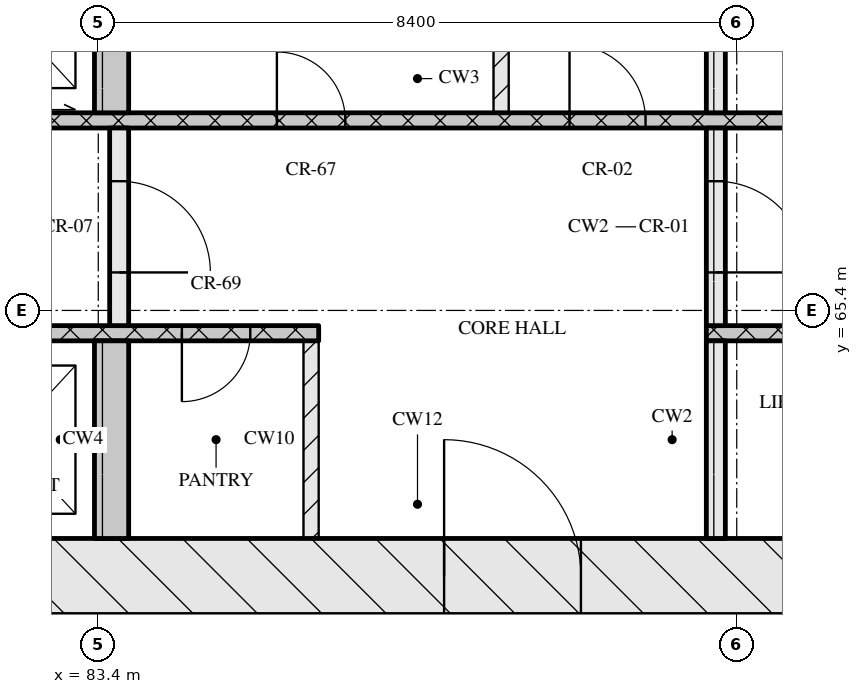
"""IFC4 building model, lengths in metres.
Left out: names, types, materials, properties, quantities, classifications, styles, units other than length and angle.
Written with IfcOpenShell. Run it as: python <this file> out.ifc"""

import sys

from ifc_helpers import new_model, si_unit, direction, frame, frame_2d, origin, place, context, subcontext, project, spatial, rectangle, extrude, element, fill, save


model = new_model("IFC4")
c1 = context("Model", 3, precision=1e-05, world=origin(), true_north=direction((0.0, 1.0)))
c2 = subcontext(c1, "Body", "Model", "MODEL_VIEW")
j1 = project(units=[si_unit("LENGTHUNIT", "METRE"), si_unit("PLANEANGLEUNIT", "RADIAN")], contexts=[c1])
p1 = place(None, origin())
s1 = spatial("IfcSite", under=j1, at=p1, CompositionType="ELEMENT")
p2 = place(p1, origin())
s2 = spatial("IfcBuilding", under=s1, at=p2, CompositionType="ELEMENT")
p3 = place(p2, frame((0.0, 0.0, 138.45)))
s3 = spatial("IfcBuildingStorey", under=s2, at=p3, CompositionType="ELEMENT", Elevation=138.45)
p4 = place(p3, frame((66.8, 61.9, 0.0), z_axis=(0.0, 0.0, 1.0), x_axis=(1.0, 0.0, 0.0)))
e1 = element("IfcWall", 1, at=p4, inside=s3, PredefinedType="SOLIDWALL", context=c2, shape_type="SweptSolid", body=[
    extrude(rectangle(XDim=41.6, YDim=1.0, at=frame_2d((20.8, 0.0))), origin(), (0.0, 0.0, 1.0), 3.3),
])
p5 = place(p4, frame((21.15, 0.0, 0.0)))
e2 = element("IfcOpeningElement", 2, at=p5, cuts=e1, PredefinedType="OPENING", context=c2, shape_type="SweptSolid", body=[
    extrude(rectangle(XDim=1.8, YDim=2.1, at=frame_2d((0.9, 1.05))), frame((0.0, 0.51, 0.0), z_axis=(0.0, -1.0, 0.0), x_axis=(1.0, 0.0, 0.0)), (0.0, 0.0, 1.0), 1.02),
])
p6 = place(p3, frame((83.575, 62.4, 0.0), z_axis=(0.0, 0.0, 1.0), x_axis=(0.0, 1.0, 0.0)))
e3 = element("IfcWall", 3, at=p6, inside=s3, PredefinedType="SOLIDWALL", context=c2, shape_type="SweptSolid", body=[
    extrude(rectangle(XDim=2.6, YDim=0.45, at=frame_2d((1.3, 0.0))), origin(), (0.0, 0.0, 1.0), 3.3),
])
p7 = place(p3, frame((86.2, 62.4, 0.0), z_axis=(0.0, 0.0, 1.0), x_axis=(0.0, 1.0, 0.0)))
e4 = element("IfcWall", 4, at=p7, inside=s3, PredefinedType="PARTITIONING", context=c2, shape_type="SweptSolid", body=[
    extrude(rectangle(XDim=2.6, YDim=0.2, at=frame_2d((1.3, 0.0))), origin(), (0.0, 0.0, 1.0), 3.3),
])
p8 = place(p3, frame((91.525, 62.4, 0.0), z_axis=(0.0, 0.0, 1.0), x_axis=(0.0, 1.0, 0.0)))
e5 = element("IfcWall", 5, at=p8, inside=s3, PredefinedType="SOLIDWALL", context=c2, shape_type="SweptSolid", body=[
    extrude(rectangle(XDim=2.6, YDim=0.25, at=frame_2d((1.3, 0.0))), origin(), (0.0, 0.0, 1.0), 3.3),
])
p9 = place(p3, frame((67.8, 65.1, 0.0), z_axis=(0.0, 0.0, 1.0), x_axis=(1.0, 0.0, 0.0)))
e6 = element("IfcWall", 6, at=p9, inside=s3, PredefinedType="SOLIDWALL", context=c2, shape_type="SweptSolid", body=[
    extrude(rectangle(XDim=18.5, YDim=0.2, at=frame_2d((9.25, 0.0))), origin(), (0.0, 0.0, 1.0), 3.3),
])
p10 = place(p9, frame((7.27, 0.0, 0.0)))
e7 = element("IfcOpeningElement", 7, at=p10, cuts=e6, PredefinedType="OPENING", context=c2, shape_type="SweptSolid", body=[
    extrude(rectangle(XDim=0.9, YDim=2.1, at=frame_2d((0.45, 1.05))), frame((0.0, 0.11, 0.0), z_axis=(0.0, -1.0, 0.0), x_axis=(1.0, 0.0, 0.0)), (0.0, 0.0, 1.0), 0.22),
])
p11 = place(p9, frame((8.85, 0.0, 0.0)))
e8 = element("IfcOpeningElement", 8, at=p11, cuts=e6, PredefinedType="OPENING", context=c2, shape_type="SweptSolid", body=[
    extrude(rectangle(XDim=1.1, YDim=2.1, at=frame_2d((0.55, 1.05))), frame((0.0, 0.11, 0.0), z_axis=(0.0, -1.0, 0.0), x_axis=(1.0, 0.0, 0.0)), (0.0, 0.0, 1.0), 0.22),
])
p12 = place(p9, frame((11.35, 0.0, 0.0)))
e9 = element("IfcOpeningElement", 9, at=p12, cuts=e6, PredefinedType="OPENING", context=c2, shape_type="SweptSolid", body=[
    extrude(rectangle(XDim=1.1, YDim=2.1, at=frame_2d((0.55, 1.05))), frame((0.0, 0.11, 0.0), z_axis=(0.0, -1.0, 0.0), x_axis=(1.0, 0.0, 0.0)), (0.0, 0.0, 1.0), 0.22),
])
p13 = place(p9, frame((13.85, 0.0, 0.0)))
e10 = element("IfcOpeningElement", 10, at=p13, cuts=e6, PredefinedType="OPENING", context=c2, shape_type="SweptSolid", body=[
    extrude(rectangle(XDim=1.1, YDim=2.1, at=frame_2d((0.55, 1.05))), frame((0.0, 0.11, 0.0), z_axis=(0.0, -1.0, 0.0), x_axis=(1.0, 0.0, 0.0)), (0.0, 0.0, 1.0), 0.22),
])
p14 = place(p9, frame((16.7, 0.0, 0.0)))
e11 = element("IfcOpeningElement", 11, at=p14, cuts=e6, PredefinedType="OPENING", context=c2, shape_type="SweptSolid", body=[
    extrude(rectangle(XDim=0.9, YDim=2.1, at=frame_2d((0.45, 1.05))), frame((0.0, 0.11, 0.0), z_axis=(0.0, -1.0, 0.0), x_axis=(1.0, 0.0, 0.0)), (0.0, 0.0, 1.0), 0.22),
])
p15 = place(p3, frame((91.4, 65.1, 0.0), z_axis=(0.0, 0.0, 1.0), x_axis=(1.0, 0.0, 0.0)))
e12 = element("IfcWall", 12, at=p15, inside=s3, PredefinedType="SOLIDWALL", context=c2, shape_type="SweptSolid", body=[
    extrude(rectangle(XDim=16.0, YDim=0.2, at=frame_2d((8.0, 0.0))), origin(), (0.0, 0.0, 1.0), 3.3),
])
p16 = place(p15, frame((7.83, 0.0, 0.0)))
e13 = element("IfcOpeningElement", 13, at=p16, cuts=e12, PredefinedType="OPENING", context=c2, shape_type="SweptSolid", body=[
    extrude(rectangle(XDim=0.9, YDim=2.1, at=frame_2d((0.45, 1.05))), frame((0.0, 0.11, 0.0), z_axis=(0.0, -1.0, 0.0), x_axis=(1.0, 0.0, 0.0)), (0.0, 0.0, 1.0), 0.22),
])
p17 = place(p3, frame((83.675, 65.2, 0.0), z_axis=(0.0, 0.0, 1.0), x_axis=(0.0, 1.0, 0.0)))
e14 = element("IfcWall", 14, at=p17, inside=s3, PredefinedType="SOLIDWALL", context=c2, shape_type="SweptSolid", body=[
    extrude(rectangle(XDim=2.6, YDim=0.25, at=frame_2d((1.3, 0.0))), origin(), (0.0, 0.0, 1.0), 3.3),
])
p18 = place(p17, frame((0.7, 0.0, 0.0)))
e15 = element("IfcOpeningElement", 15, at=p18, cuts=e14, PredefinedType="OPENING", context=c2, shape_type="SweptSolid", body=[
    extrude(rectangle(XDim=1.2, YDim=2.1, at=frame_2d((0.6, 1.05))), frame((0.0, 0.135, 0.0), z_axis=(0.0, -1.0, 0.0), x_axis=(1.0, 0.0, 0.0)), (0.0, 0.0, 1.0), 0.27),
])
p19 = place(p3, frame((91.525, 65.2, 0.0), z_axis=(0.0, 0.0, 1.0), x_axis=(0.0, 1.0, 0.0)))
e16 = element("IfcWall", 16, at=p19, inside=s3, PredefinedType="SOLIDWALL", context=c2, shape_type="SweptSolid", body=[
    extrude(rectangle(XDim=2.6, YDim=0.25, at=frame_2d((1.3, 0.0))), origin(), (0.0, 0.0, 1.0), 3.3),
])
p20 = place(p19, frame((0.7, 0.0, 0.0)))
e17 = element("IfcOpeningElement", 17, at=p20, cuts=e16, PredefinedType="OPENING", context=c2, shape_type="SweptSolid", body=[
    extrude(rectangle(XDim=1.2, YDim=2.1, at=frame_2d((0.6, 1.05))), frame((0.0, 0.135, 0.0), z_axis=(0.0, -1.0, 0.0), x_axis=(1.0, 0.0, 0.0)), (0.0, 0.0, 1.0), 0.27),
])
p21 = place(p3, frame((76.05, 67.9, 0.0), z_axis=(0.0, 0.0, 1.0), x_axis=(1.0, 0.0, 0.0)))
e18 = element("IfcWall", 18, at=p21, inside=s3, PredefinedType="SOLIDWALL", context=c2, shape_type="SweptSolid", body=[
    extrude(rectangle(XDim=23.1, YDim=0.2, at=frame_2d((11.55, 0.0))), origin(), (0.0, 0.0, 1.0), 3.3),
])
p22 = place(p21, frame((0.6, 0.0, 0.0)))
e19 = element("IfcOpeningElement", 19, at=p22, cuts=e18, PredefinedType="OPENING", context=c2, shape_type="SweptSolid", body=[
    extrude(rectangle(XDim=1.1, YDim=2.1, at=frame_2d((0.55, 1.05))), frame((0.0, 0.11, 0.0), z_axis=(0.0, -1.0, 0.0), x_axis=(1.0, 0.0, 0.0)), (0.0, 0.0, 1.0), 0.22),
])
p23 = place(p21, frame((3.1, 0.0, 0.0)))
e20 = element("IfcOpeningElement", 20, at=p23, cuts=e18, PredefinedType="OPENING", context=c2, shape_type="SweptSolid", body=[
    extrude(rectangle(XDim=1.1, YDim=2.1, at=frame_2d((0.55, 1.05))), frame((0.0, 0.11, 0.0), z_axis=(0.0, -1.0, 0.0), x_axis=(1.0, 0.0, 0.0)), (0.0, 0.0, 1.0), 0.22),
])
p24 = place(p21, frame((5.6, 0.0, 0.0)))
e21 = element("IfcOpeningElement", 21, at=p24, cuts=e18, PredefinedType="OPENING", context=c2, shape_type="SweptSolid", body=[
    extrude(rectangle(XDim=1.1, YDim=2.1, at=frame_2d((0.55, 1.05))), frame((0.0, 0.11, 0.0), z_axis=(0.0, -1.0, 0.0), x_axis=(1.0, 0.0, 0.0)), (0.0, 0.0, 1.0), 0.22),
])
p25 = place(p21, frame((9.7, 0.0, 0.0)))
e22 = element("IfcOpeningElement", 22, at=p25, cuts=e18, PredefinedType="OPENING", context=c2, shape_type="SweptSolid", body=[
    extrude(rectangle(XDim=0.9, YDim=2.1, at=frame_2d((0.45, 1.05))), frame((0.0, 0.11, 0.0), z_axis=(0.0, -1.0, 0.0), x_axis=(1.0, 0.0, 0.0)), (0.0, 0.0, 1.0), 0.22),
])
p26 = place(p21, frame((13.55, 0.0, 0.0)))
e23 = element("IfcOpeningElement", 23, at=p26, cuts=e18, PredefinedType="OPENING", context=c2, shape_type="SweptSolid", body=[
    extrude(rectangle(XDim=1.0, YDim=2.1, at=frame_2d((0.5, 1.05))), frame((0.0, 0.11, 0.0), z_axis=(0.0, -1.0, 0.0), x_axis=(1.0, 0.0, 0.0)), (0.0, 0.0, 1.0), 0.22),
])
p27 = place(p3, frame((83.575, 68.0, 0.0), z_axis=(0.0, 0.0, 1.0), x_axis=(0.0, 1.0, 0.0)))
e24 = element("IfcWall", 24, at=p27, inside=s3, PredefinedType="SOLIDWALL", context=c2, shape_type="SweptSolid", body=[
    extrude(rectangle(XDim=2.6, YDim=0.45, at=frame_2d((1.3, 0.0))), origin(), (0.0, 0.0, 1.0), 3.3),
])
p28 = place(p3, frame((88.7, 68.0, 0.0), z_axis=(0.0, 0.0, 1.0), x_axis=(0.0, 1.0, 0.0)))
e25 = element("IfcWall", 25, at=p28, inside=s3, PredefinedType="PARTITIONING", context=c2, shape_type="SweptSolid", body=[
    extrude(rectangle(XDim=2.6, YDim=0.2, at=frame_2d((1.3, 0.0))), origin(), (0.0, 0.0, 1.0), 3.3),
])
p29 = place(p3, frame((91.525, 68.0, 0.0), z_axis=(0.0, 0.0, 1.0), x_axis=(0.0, 1.0, 0.0)))
e26 = element("IfcWall", 26, at=p29, inside=s3, PredefinedType="SOLIDWALL", context=c2, shape_type="SweptSolid", body=[
    extrude(rectangle(XDim=2.6, YDim=0.25, at=frame_2d((1.3, 0.0))), origin(), (0.0, 0.0, 1.0), 3.3),
])
p30 = place(p5, origin())
e27 = element("IfcDoor", 27, at=p30, inside=s3, OperationType="DOUBLE_DOOR_SINGLE_SWING", PredefinedType="DOOR", context=c2, shape_type="SweptSolid", body=[
    extrude(rectangle(XDim=1.8, YDim=2.1, at=frame_2d((0.9, 1.05))), frame((0.0, 0.025, 0.0), z_axis=(0.0, -1.0, 0.0), x_axis=(1.0, 0.0, 0.0)), (0.0, 0.0, 1.0), 0.05),
])
fill(e2, e27)
p31 = place(p14, origin())
e28 = element("IfcDoor", 28, at=p31, inside=s3, OperationType="SINGLE_SWING_RIGHT", PredefinedType="DOOR", context=c2, shape_type="SweptSolid", body=[
    extrude(rectangle(XDim=0.9, YDim=2.1, at=frame_2d((0.45, 1.05))), frame((0.0, 0.025, 0.0), z_axis=(0.0, -1.0, 0.0), x_axis=(1.0, 0.0, 0.0)), (0.0, 0.0, 1.0), 0.05),
])
fill(e11, e28)
p32 = place(p18, origin())
e29 = element("IfcDoor", 29, at=p32, inside=s3, OperationType="SINGLE_SWING_RIGHT", PredefinedType="DOOR", context=c2, shape_type="SweptSolid", body=[
    extrude(rectangle(XDim=1.2, YDim=2.1, at=frame_2d((0.6, 1.05))), frame((0.0, 0.025, 0.0), z_axis=(0.0, -1.0, 0.0), x_axis=(1.0, 0.0, 0.0)), (0.0, 0.0, 1.0), 0.05),
])
fill(e15, e29)
p33 = place(p20, origin())
e30 = element("IfcDoor", 30, at=p33, inside=s3, OperationType="SINGLE_SWING_RIGHT", PredefinedType="DOOR", context=c2, shape_type="SweptSolid", body=[
    extrude(rectangle(XDim=1.2, YDim=2.1, at=frame_2d((0.6, 1.05))), frame((0.0, 0.025, 0.0), z_axis=(0.0, -1.0, 0.0), x_axis=(1.0, 0.0, 0.0)), (0.0, 0.0, 1.0), 0.05),
])
fill(e17, e30)
p34 = place(p25, origin())
e31 = element("IfcDoor", 31, at=p34, inside=s3, OperationType="SINGLE_SWING_LEFT", PredefinedType="DOOR", context=c2, shape_type="SweptSolid", body=[
    extrude(rectangle(XDim=0.9, YDim=2.1, at=frame_2d((0.45, 1.05))), frame((0.0, 0.025, 0.0), z_axis=(0.0, -1.0, 0.0), x_axis=(1.0, 0.0, 0.0)), (0.0, 0.0, 1.0), 0.05),
])
fill(e22, e31)
p35 = place(p26, origin())
e32 = element("IfcDoor", 32, at=p35, inside=s3, OperationType="SINGLE_SWING_LEFT", PredefinedType="DOOR", context=c2, shape_type="SweptSolid", body=[
    extrude(rectangle(XDim=1.0, YDim=2.1, at=frame_2d((0.5, 1.05))), frame((0.0, 0.025, 0.0), z_axis=(0.0, -1.0, 0.0), x_axis=(1.0, 0.0, 0.0)), (0.0, 0.0, 1.0), 0.05),
])
fill(e23, e32)
save(model, sys.argv[1])
